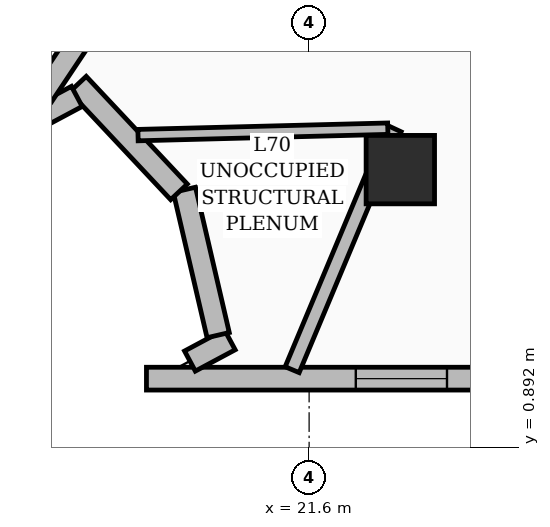
"""IFC4 building model, lengths in metres.
Left out: names, types, materials, properties, quantities, classifications, styles, units other than length and angle.
Written with IfcOpenShell. Run it as: python <this file> out.ifc"""

import sys

from ifc_helpers import new_model, si_unit, direction, frame, frame_2d, origin, origin_2d, place, context, subcontext, project, spatial, rectangle, extrude, element, fill, save


model = new_model("IFC4")
c1 = context("Model", 3, precision=1e-05, world=origin(), true_north=direction((0.0, 1.0)))
c2 = subcontext(c1, "Body", "Model", "MODEL_VIEW")
j1 = project(units=[si_unit("LENGTHUNIT", "METRE"), si_unit("PLANEANGLEUNIT", "RADIAN")], contexts=[c1])
p1 = place(None, origin())
s1 = spatial("IfcSite", under=j1, at=p1, CompositionType="ELEMENT")
p2 = place(p1, origin())
s2 = spatial("IfcBuilding", under=s1, at=p2, CompositionType="ELEMENT")
p3 = place(p2, frame((0.0, 0.0, 270.75)))
s3 = spatial("IfcBuildingStorey", under=s2, at=p3, CompositionType="ELEMENT", Elevation=270.75)
p4 = place(p3, frame((22.8, 4.55, 0.0), z_axis=(0.0, 0.0, 1.0), x_axis=(1.0, 0.0, 0.0)))
e1 = element("IfcColumn", 1, at=p4, inside=s3, PredefinedType="COLUMN", context=c2, shape_type="SweptSolid", body=[
    extrude(rectangle(XDim=0.9, YDim=0.9, at=origin_2d()), origin(), (0.0, 0.0, 1.0), 3.75),
])
p5 = place(p3, frame((24.464, 1.8, 0.0), z_axis=(0.0, 0.0, 1.0), x_axis=(-1.0, 0.0, 0.0)))
e2 = element("IfcWall", 2, at=p5, inside=s3, PredefinedType="SOLIDWALL", context=c2, shape_type="SweptSolid", body=[
    extrude(rectangle(XDim=5.004, YDim=0.3, at=frame_2d((2.502, 0.0))), origin(), (0.0, 0.0, 1.0), 3.5),
])
p6 = place(p5, frame((1.05, 0.0, 0.8)))
e3 = element("IfcOpeningElement", 3, at=p6, cuts=e2, PredefinedType="OPENING", context=c2, shape_type="SweptSolid", body=[
    extrude(rectangle(XDim=1.2, YDim=1.8, at=frame_2d((0.6, 0.9))), frame((0.0, 0.16, 0.0), z_axis=(0.0, -1.0, 0.0), x_axis=(1.0, 0.0, 0.0)), (0.0, 0.0, 1.0), 0.32),
])
p7 = place(p3, frame((20.032, 2.031, 0.0), z_axis=(0.0, 0.0, 1.0), x_axis=(0.881601971089, 0.471993606495, 0.0)))
e4 = element("IfcWall", 4, at=p7, inside=s3, PredefinedType="SOLIDWALL", context=c2, shape_type="SweptSolid", body=[
    extrude(rectangle(XDim=0.595, YDim=0.3, at=frame_2d((0.297, 0.0))), origin(), (0.0, 0.0, 1.0), 3.5),
])
p8 = place(p3, frame((20.404, 2.373, 0.0), z_axis=(0.0, 0.0, 1.0), x_axis=(-0.226376282289, 0.974039926706, 0.0)))
e5 = element("IfcWall", 5, at=p8, inside=s3, PredefinedType="SOLIDWALL", context=c2, shape_type="SweptSolid", body=[
    extrude(rectangle(XDim=1.963, YDim=0.3, at=frame_2d((0.981, 0.0))), origin(), (0.0, 0.0, 1.0), 3.5),
])
p9 = place(p3, frame((19.888, 4.257, 0.0), z_axis=(0.0, 0.0, 1.0), x_axis=(-0.684454988333, 0.72905512065, 0.0)))
e6 = element("IfcWall", 6, at=p9, inside=s3, PredefinedType="SOLIDWALL", context=c2, shape_type="SweptSolid", body=[
    extrude(rectangle(XDim=1.943, YDim=0.3, at=frame_2d((0.972, 0.0))), origin(), (0.0, 0.0, 1.0), 3.5),
])
p10 = place(p3, frame((18.544, 5.513, 0.0), z_axis=(0.0, 0.0, 1.0), x_axis=(-0.881986380724, -0.471274892412, 0.0)))
e7 = element("IfcWall", 7, at=p10, inside=s3, PredefinedType="SOLIDWALL", context=c2, shape_type="SweptSolid", body=[
    extrude(rectangle(XDim=0.959, YDim=0.3, at=frame_2d((0.48, 0.0))), origin(), (0.0, 0.0, 1.0), 3.5),
])
p11 = place(p3, frame((18.087, 5.526, 0.0), z_axis=(0.0, 0.0, 1.0), x_axis=(0.555237602255, 0.831691772859, 0.0)))
e8 = element("IfcWall", 8, at=p11, inside=s3, PredefinedType="SOLIDWALL", context=c2, shape_type="SweptSolid", body=[
    extrude(rectangle(XDim=6.708, YDim=0.3, at=frame_2d((3.354, 0.0))), origin(), (0.0, 0.0, 1.0), 3.5),
])
p12 = place(p11, frame((2.655, 0.0, 0.6)))
e9 = element("IfcOpeningElement", 9, at=p12, cuts=e8, PredefinedType="OPENING", context=c2, shape_type="SweptSolid", body=[
    extrude(rectangle(XDim=1.5, YDim=2.1, at=frame_2d((0.75, 1.05))), frame((0.0, 0.16, 0.0), z_axis=(0.0, -1.0, 0.0), x_axis=(1.0, 0.0, 0.0)), (0.0, 0.0, 1.0), 0.32),
])
p13 = place(p3, frame((22.58, 4.79, 0.0), z_axis=(0.0, 0.0, 1.0), x_axis=(-0.386373900267, -0.922342240816, 0.0)))
e10 = element("IfcWall", 10, at=p13, inside=s3, PredefinedType="PARTITIONING", context=c2, shape_type="SweptSolid", body=[
    extrude(rectangle(XDim=3.114, YDim=0.2, at=frame_2d((1.557, 0.0))), origin(), (0.0, 0.0, 1.0), 3.5),
])
p14 = place(p3, frame((22.72, 5.09, 0.0), z_axis=(0.0, 0.0, 1.0), x_axis=(-0.422562464906, -0.906333803437, 0.0)))
e11 = element("IfcWall", 11, at=p14, inside=s3, PredefinedType="PARTITIONING", context=c2, shape_type="SweptSolid", body=[
    extrude(rectangle(XDim=0.331, YDim=0.2, at=frame_2d((0.166, 0.0))), origin(), (0.0, 0.0, 1.0), 3.5),
])
p15 = place(p3, frame((19.349, 5.004, 0.0), z_axis=(0.0, 0.0, 1.0), x_axis=(0.999667809718, 0.025773440075, 0.0)))
e12 = element("IfcWall", 12, at=p15, inside=s3, PredefinedType="PARTITIONING", context=c2, shape_type="SweptSolid", body=[
    extrude(rectangle(XDim=3.287, YDim=0.15, at=frame_2d((1.644, 0.0))), origin(), (0.0, 0.0, 1.0), 3.5),
])
p16 = place(p6, origin())
e13 = element("IfcWindow", 13, at=p16, inside=s3, PartitioningType="SINGLE_PANEL", PredefinedType="WINDOW", context=c2, shape_type="SweptSolid", body=[
    extrude(rectangle(XDim=1.2, YDim=1.8, at=frame_2d((0.6, 0.9))), frame((0.0, 0.03, 0.0), z_axis=(0.0, -1.0, 0.0), x_axis=(1.0, 0.0, 0.0)), (0.0, 0.0, 1.0), 0.06),
])
fill(e3, e13)
save(model, sys.argv[1])
